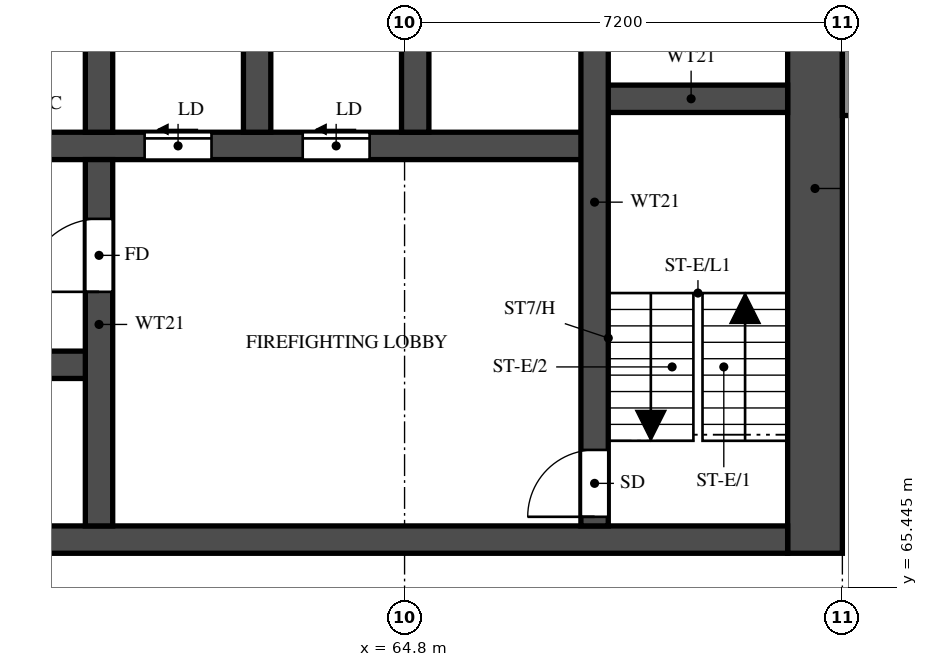
"""IFC4 building model, lengths in metres.
Left out: names, types, materials, properties, quantities, classifications, styles, units other than length and angle.
Written with IfcOpenShell. Run it as: python <this file> out.ifc"""

import sys

from ifc_helpers import new_model, si_unit, direction, frame, frame_2d, origin, place, context, subcontext, project, spatial, rectangle, extrude, element, fill, save


model = new_model("IFC4")
c1 = context("Model", 3, precision=1e-05, world=origin(), true_north=direction((0.0, 1.0)))
c2 = subcontext(c1, "Body", "Model", "MODEL_VIEW")
j1 = project(units=[si_unit("LENGTHUNIT", "METRE"), si_unit("PLANEANGLEUNIT", "RADIAN")], contexts=[c1])
p1 = place(None, origin())
s1 = spatial("IfcSite", under=j1, at=p1, CompositionType="ELEMENT")
p2 = place(p1, origin())
s2 = spatial("IfcBuilding", under=s1, at=p2, CompositionType="ELEMENT")
p3 = place(p2, frame((0.0, 0.0, 62.0)))
s3 = spatial("IfcBuildingStorey", under=s2, at=p3, CompositionType="ELEMENT", Elevation=62.0)
p4 = place(p3, frame((71.55, 66.0, 0.0), z_axis=(0.0, 0.0, 1.0), x_axis=(0.0, 1.0, 0.0)))
e1 = element("IfcWall", 1, at=p4, inside=s3, PredefinedType="SHEAR", context=c2, shape_type="SweptSolid", body=[
    extrude(rectangle(XDim=12.0, YDim=0.9, at=frame_2d((6.0, 0.0))), origin(), (0.0, 0.0, 1.0), 3.18),
])
p5 = place(p3, frame((29.7, 66.225, 0.0), z_axis=(0.0, 0.0, 1.0), x_axis=(1.0, 0.0, 0.0)))
e2 = element("IfcWall", 2, at=p5, inside=s3, PredefinedType="SHEAR", context=c2, shape_type="SweptSolid", body=[
    extrude(rectangle(XDim=41.4, YDim=0.45, at=frame_2d((20.7, 0.0))), origin(), (0.0, 0.0, 1.0), 3.18),
])
p6 = place(p5, frame((0.925, 0.0, 0.0)))
e3 = element("IfcOpeningElement", 3, at=p6, cuts=e2, PredefinedType="OPENING", context=c2, shape_type="SweptSolid", body=[
    extrude(rectangle(XDim=1.1, YDim=2.1, at=frame_2d((0.55, 1.05))), frame((0.0, 0.235, 0.0), z_axis=(0.0, -1.0, 0.0), x_axis=(1.0, 0.0, 0.0)), (0.0, 0.0, 1.0), 0.47),
])
p7 = place(p5, frame((3.738, 0.0, 0.0)))
e4 = element("IfcOpeningElement", 4, at=p7, cuts=e2, PredefinedType="OPENING", context=c2, shape_type="SweptSolid", body=[
    extrude(rectangle(XDim=1.8, YDim=2.1, at=frame_2d((0.9, 1.05))), frame((0.0, 0.235, 0.0), z_axis=(0.0, -1.0, 0.0), x_axis=(1.0, 0.0, 0.0)), (0.0, 0.0, 1.0), 0.47),
])
p8 = place(p3, frame((35.575, 69.1, 0.0), z_axis=(0.0, 0.0, 1.0), x_axis=(1.0, 0.0, 0.0)))
e5 = element("IfcWall", 5, at=p8, inside=s3, PredefinedType="SHEAR", context=c2, shape_type="SweptSolid", body=[
    extrude(rectangle(XDim=24.2, YDim=0.45, at=frame_2d((12.1, 0.0))), origin(), (0.0, 0.0, 1.0), 3.18),
])
p9 = place(p8, frame((1.05, 0.0, 0.0)))
e6 = element("IfcOpeningElement", 6, at=p9, cuts=e5, PredefinedType="OPENING", context=c2, shape_type="SweptSolid", body=[
    extrude(rectangle(XDim=1.1, YDim=2.1, at=frame_2d((0.55, 1.05))), frame((0.0, 0.235, 0.0), z_axis=(0.0, -1.0, 0.0), x_axis=(1.0, 0.0, 0.0)), (0.0, 0.0, 1.0), 0.47),
])
p10 = place(p8, frame((3.8, 0.0, 0.0)))
e7 = element("IfcOpeningElement", 7, at=p10, cuts=e5, PredefinedType="OPENING", context=c2, shape_type="SweptSolid", body=[
    extrude(rectangle(XDim=1.1, YDim=2.1, at=frame_2d((0.55, 1.05))), frame((0.0, 0.235, 0.0), z_axis=(0.0, -1.0, 0.0), x_axis=(1.0, 0.0, 0.0)), (0.0, 0.0, 1.0), 0.47),
])
p11 = place(p8, frame((6.55, 0.0, 0.0)))
e8 = element("IfcOpeningElement", 8, at=p11, cuts=e5, PredefinedType="OPENING", context=c2, shape_type="SweptSolid", body=[
    extrude(rectangle(XDim=1.1, YDim=2.1, at=frame_2d((0.55, 1.05))), frame((0.0, 0.235, 0.0), z_axis=(0.0, -1.0, 0.0), x_axis=(1.0, 0.0, 0.0)), (0.0, 0.0, 1.0), 0.47),
])
p12 = place(p8, frame((9.3, 0.0, 0.0)))
e9 = element("IfcOpeningElement", 9, at=p12, cuts=e5, PredefinedType="OPENING", context=c2, shape_type="SweptSolid", body=[
    extrude(rectangle(XDim=1.1, YDim=2.1, at=frame_2d((0.55, 1.05))), frame((0.0, 0.235, 0.0), z_axis=(0.0, -1.0, 0.0), x_axis=(1.0, 0.0, 0.0)), (0.0, 0.0, 1.0), 0.47),
])
p13 = place(p8, frame((12.05, 0.0, 0.0)))
e10 = element("IfcOpeningElement", 10, at=p13, cuts=e5, PredefinedType="OPENING", context=c2, shape_type="SweptSolid", body=[
    extrude(rectangle(XDim=1.1, YDim=2.1, at=frame_2d((0.55, 1.05))), frame((0.0, 0.235, 0.0), z_axis=(0.0, -1.0, 0.0), x_axis=(1.0, 0.0, 0.0)), (0.0, 0.0, 1.0), 0.47),
])
p14 = place(p8, frame((14.8, 0.0, 0.0)))
e11 = element("IfcOpeningElement", 11, at=p14, cuts=e5, PredefinedType="OPENING", context=c2, shape_type="SweptSolid", body=[
    extrude(rectangle(XDim=1.1, YDim=2.1, at=frame_2d((0.55, 1.05))), frame((0.0, 0.235, 0.0), z_axis=(0.0, -1.0, 0.0), x_axis=(1.0, 0.0, 0.0)), (0.0, 0.0, 1.0), 0.47),
])
p15 = place(p3, frame((32.875, 72.7, 0.0), z_axis=(0.0, 0.0, 1.0), x_axis=(1.0, 0.0, 0.0)))
e12 = element("IfcWall", 12, at=p15, inside=s3, PredefinedType="SHEAR", context=c2, shape_type="SweptSolid", body=[
    extrude(rectangle(XDim=35.05, YDim=0.45, at=frame_2d((17.525, 0.0))), origin(), (0.0, 0.0, 1.0), 3.18),
])
p16 = place(p15, frame((19.8, 0.0, 0.0)))
e13 = element("IfcOpeningElement", 13, at=p16, cuts=e12, PredefinedType="OPENING", context=c2, shape_type="SweptSolid", body=[
    extrude(rectangle(XDim=1.1, YDim=2.1, at=frame_2d((0.55, 1.05))), frame((0.0, 0.235, 0.0), z_axis=(0.0, -1.0, 0.0), x_axis=(1.0, 0.0, 0.0)), (0.0, 0.0, 1.0), 0.47),
])
p17 = place(p15, frame((27.65, 0.0, 0.0)))
e14 = element("IfcOpeningElement", 14, at=p17, cuts=e12, PredefinedType="OPENING", context=c2, shape_type="SweptSolid", body=[
    extrude(rectangle(XDim=1.1, YDim=2.1, at=frame_2d((0.55, 1.05))), frame((0.0, 0.235, 0.0), z_axis=(0.0, -1.0, 0.0), x_axis=(1.0, 0.0, 0.0)), (0.0, 0.0, 1.0), 0.47),
])
p18 = place(p15, frame((30.25, 0.0, 0.0)))
e15 = element("IfcOpeningElement", 15, at=p18, cuts=e12, PredefinedType="OPENING", context=c2, shape_type="SweptSolid", body=[
    extrude(rectangle(XDim=1.1, YDim=2.1, at=frame_2d((0.55, 1.05))), frame((0.0, 0.235, 0.0), z_axis=(0.0, -1.0, 0.0), x_axis=(1.0, 0.0, 0.0)), (0.0, 0.0, 1.0), 0.47),
])
p19 = place(p15, frame((3.75, 0.0, 0.0)))
e16 = element("IfcOpeningElement", 16, at=p19, cuts=e12, PredefinedType="OPENING", context=c2, shape_type="SweptSolid", body=[
    extrude(rectangle(XDim=1.1, YDim=2.1, at=frame_2d((0.55, 1.05))), frame((0.0, 0.235, 0.0), z_axis=(0.0, -1.0, 0.0), x_axis=(1.0, 0.0, 0.0)), (0.0, 0.0, 1.0), 0.47),
])
p20 = place(p15, frame((6.5, 0.0, 0.0)))
e17 = element("IfcOpeningElement", 17, at=p20, cuts=e12, PredefinedType="OPENING", context=c2, shape_type="SweptSolid", body=[
    extrude(rectangle(XDim=1.1, YDim=2.1, at=frame_2d((0.55, 1.05))), frame((0.0, 0.235, 0.0), z_axis=(0.0, -1.0, 0.0), x_axis=(1.0, 0.0, 0.0)), (0.0, 0.0, 1.0), 0.47),
])
p21 = place(p15, frame((9.25, 0.0, 0.0)))
e18 = element("IfcOpeningElement", 18, at=p21, cuts=e12, PredefinedType="OPENING", context=c2, shape_type="SweptSolid", body=[
    extrude(rectangle(XDim=1.1, YDim=2.1, at=frame_2d((0.55, 1.05))), frame((0.0, 0.235, 0.0), z_axis=(0.0, -1.0, 0.0), x_axis=(1.0, 0.0, 0.0)), (0.0, 0.0, 1.0), 0.47),
])
p22 = place(p15, frame((12.0, 0.0, 0.0)))
e19 = element("IfcOpeningElement", 19, at=p22, cuts=e12, PredefinedType="OPENING", context=c2, shape_type="SweptSolid", body=[
    extrude(rectangle(XDim=1.1, YDim=2.1, at=frame_2d((0.55, 1.05))), frame((0.0, 0.235, 0.0), z_axis=(0.0, -1.0, 0.0), x_axis=(1.0, 0.0, 0.0)), (0.0, 0.0, 1.0), 0.47),
])
p23 = place(p15, frame((14.75, 0.0, 0.0)))
e20 = element("IfcOpeningElement", 20, at=p23, cuts=e12, PredefinedType="OPENING", context=c2, shape_type="SweptSolid", body=[
    extrude(rectangle(XDim=1.1, YDim=2.1, at=frame_2d((0.55, 1.05))), frame((0.0, 0.235, 0.0), z_axis=(0.0, -1.0, 0.0), x_axis=(1.0, 0.0, 0.0)), (0.0, 0.0, 1.0), 0.47),
])
p24 = place(p15, frame((17.5, 0.0, 0.0)))
e21 = element("IfcOpeningElement", 21, at=p24, cuts=e12, PredefinedType="OPENING", context=c2, shape_type="SweptSolid", body=[
    extrude(rectangle(XDim=1.1, YDim=2.1, at=frame_2d((0.55, 1.05))), frame((0.0, 0.235, 0.0), z_axis=(0.0, -1.0, 0.0), x_axis=(1.0, 0.0, 0.0)), (0.0, 0.0, 1.0), 0.47),
])
p25 = place(p15, frame((0.913, 0.0, 0.0)))
e22 = element("IfcOpeningElement", 22, at=p25, cuts=e12, PredefinedType="OPENING", context=c2, shape_type="SweptSolid", body=[
    extrude(rectangle(XDim=1.1, YDim=2.1, at=frame_2d((0.55, 1.05))), frame((0.0, 0.235, 0.0), z_axis=(0.0, -1.0, 0.0), x_axis=(1.0, 0.0, 0.0)), (0.0, 0.0, 1.0), 0.47),
])
p26 = place(p3, frame((67.925, 73.475, 0.0), z_axis=(0.0, 0.0, 1.0), x_axis=(1.0, 0.0, 0.0)))
e23 = element("IfcWall", 23, at=p26, inside=s3, PredefinedType="SHEAR", context=c2, shape_type="SweptSolid", body=[
    extrude(rectangle(XDim=3.175, YDim=0.45, at=frame_2d((1.587, 0.0))), origin(), (0.0, 0.0, 1.0), 3.18),
])
p27 = place(p3, frame((67.925, 66.45, 0.0), z_axis=(0.0, 0.0, 1.0), x_axis=(0.0, 1.0, 0.0)))
e24 = element("IfcWall", 24, at=p27, inside=s3, PredefinedType="SHEAR", context=c2, shape_type="SweptSolid", body=[
    extrude(rectangle(XDim=10.65, YDim=0.45, at=frame_2d((5.325, 0.0))), origin(), (0.0, 0.0, 1.0), 3.18),
])
p28 = place(p27, frame((0.15, 0.0, 0.0)))
e25 = element("IfcOpeningElement", 25, at=p28, cuts=e24, PredefinedType="OPENING", context=c2, shape_type="SweptSolid", body=[
    extrude(rectangle(XDim=1.1, YDim=2.1, at=frame_2d((0.55, 1.05))), frame((0.0, 0.235, 0.0), z_axis=(0.0, -1.0, 0.0), x_axis=(1.0, 0.0, 0.0)), (0.0, 0.0, 1.0), 0.47),
])
p29 = place(p3, frame((59.775, 66.45, 0.0), z_axis=(0.0, 0.0, 1.0), x_axis=(0.0, 1.0, 0.0)))
e26 = element("IfcWall", 26, at=p29, inside=s3, PredefinedType="SHEAR", context=c2, shape_type="SweptSolid", body=[
    extrude(rectangle(XDim=6.025, YDim=0.45, at=frame_2d((3.013, 0.0))), origin(), (0.0, 0.0, 1.0), 3.18),
])
p30 = place(p29, frame((3.85, 0.0, 0.0)))
e27 = element("IfcOpeningElement", 27, at=p30, cuts=e26, PredefinedType="OPENING", context=c2, shape_type="SweptSolid", body=[
    extrude(rectangle(XDim=1.2, YDim=2.1, at=frame_2d((0.6, 1.05))), frame((0.0, 0.235, 0.0), z_axis=(0.0, -1.0, 0.0), x_axis=(1.0, 0.0, 0.0)), (0.0, 0.0, 1.0), 0.47),
])
for number, where, z_axis, x_axis in (
    (28, (59.775, 72.925, 0.0), (0.0, 0.0, 1.0), (0.0, 1.0, 0.0)),
    (29, (62.375, 72.925, 0.0), (0.0, 0.0, 1.0), (0.0, 1.0, 0.0)),
    (30, (64.975, 72.925, 0.0), (0.0, 0.0, 1.0), (0.0, 1.0, 0.0)),
):
    element("IfcWall", number, at=place(p3, frame(where, z_axis=z_axis, x_axis=x_axis)), inside=s3, PredefinedType="SHEAR", context=c2, shape_type="SweptSolid", body=[
        extrude(rectangle(XDim=2.95, YDim=0.45, at=frame_2d((1.475, 0.0))), origin(), (0.0, 0.0, 1.0), 3.18),
    ])
p31 = place(p3, frame((72.1, 73.2, 0.0), z_axis=(0.0, 0.0, 1.0), x_axis=(0.0, 1.0, 0.0)))
e31 = element("IfcWall", 31, at=p31, inside=s3, PredefinedType="SOLIDWALL", context=c2, shape_type="SweptSolid", body=[
    extrude(rectangle(XDim=4.8, YDim=0.2, at=frame_2d((2.4, 0.0))), origin(), (0.0, 0.0, 1.0), 3.18),
])
p32 = place(p28, origin())
e32 = element("IfcDoor", 32, at=p32, inside=s3, OperationType="SINGLE_SWING_LEFT", PredefinedType="DOOR", context=c2, shape_type="SweptSolid", body=[
    extrude(rectangle(XDim=1.1, YDim=2.1, at=frame_2d((0.55, 1.05))), frame((0.0, 0.025, 0.0), z_axis=(0.0, -1.0, 0.0), x_axis=(1.0, 0.0, 0.0)), (0.0, 0.0, 1.0), 0.05),
])
fill(e25, e32)
p33 = place(p30, origin())
e33 = element("IfcDoor", 33, at=p33, inside=s3, OperationType="SINGLE_SWING_RIGHT", PredefinedType="DOOR", context=c2, shape_type="SweptSolid", body=[
    extrude(rectangle(XDim=1.2, YDim=2.1, at=frame_2d((0.6, 1.05))), frame((0.0, 0.025, 0.0), z_axis=(0.0, -1.0, 0.0), x_axis=(1.0, 0.0, 0.0)), (0.0, 0.0, 1.0), 0.05),
])
fill(e27, e33)
p34 = place(p17, origin())
e34 = element("IfcDoor", 34, at=p34, inside=s3, OperationType="SLIDING_TO_LEFT", PredefinedType="DOOR", context=c2, shape_type="SweptSolid", body=[
    extrude(rectangle(XDim=1.1, YDim=2.1, at=frame_2d((0.55, 1.05))), frame((0.0, 0.025, 0.0), z_axis=(0.0, -1.0, 0.0), x_axis=(1.0, 0.0, 0.0)), (0.0, 0.0, 1.0), 0.05),
])
fill(e14, e34)
p35 = place(p18, origin())
e35 = element("IfcDoor", 35, at=p35, inside=s3, OperationType="SLIDING_TO_LEFT", PredefinedType="DOOR", context=c2, shape_type="SweptSolid", body=[
    extrude(rectangle(XDim=1.1, YDim=2.1, at=frame_2d((0.55, 1.05))), frame((0.0, 0.025, 0.0), z_axis=(0.0, -1.0, 0.0), x_axis=(1.0, 0.0, 0.0)), (0.0, 0.0, 1.0), 0.05),
])
fill(e15, e35)
save(model, sys.argv[1])
